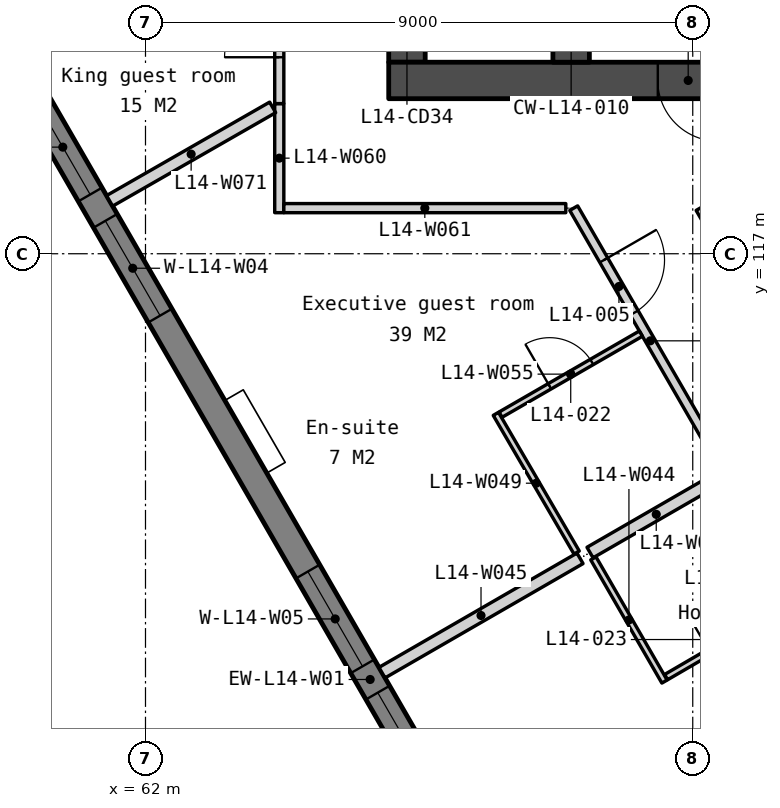
"""IFC4 building model, lengths in metres.
Left out: names, types, materials, properties, quantities, classifications, styles, units other than length and angle.
Written with IfcOpenShell. Run it as: python <this file> out.ifc"""

import sys

from ifc_helpers import new_model, si_unit, direction, frame, frame_2d, origin, place, context, subcontext, project, spatial, polyline, rectangle, outline, extrude, element, fill, save


model = new_model("IFC4")
c1 = context("Model", 3, precision=1e-05, world=origin(), true_north=direction((0.0, 1.0)))
c2 = subcontext(c1, "Body", "Model", "MODEL_VIEW")
j1 = project(units=[si_unit("LENGTHUNIT", "METRE"), si_unit("PLANEANGLEUNIT", "RADIAN")], contexts=[c1])
p1 = place(None, origin())
s1 = spatial("IfcSite", under=j1, at=p1, CompositionType="ELEMENT")
p2 = place(p1, origin())
s2 = spatial("IfcBuilding", under=s1, at=p2, CompositionType="ELEMENT")
p3 = place(p2, frame((0.0, 0.0, 63.0)))
s3 = spatial("IfcBuildingStorey", under=s2, at=p3, CompositionType="ELEMENT", Elevation=63.0)
p4 = place(p3, frame((66.3, 133.95, 0.0), z_axis=(0.0, 0.0, 1.0), x_axis=(0.0, -1.0, 0.0)))
e1 = element("IfcWall", 1, at=p4, inside=s3, PredefinedType="SOLIDWALL", context=c2, shape_type="SweptSolid", body=[
    extrude(rectangle(XDim=13.8, YDim=0.6, at=frame_2d((6.9, 0.0))), origin(), (0.0, 0.0, 1.0), 3.35),
])
p5 = place(p4, frame((0.6, 0.0, 0.0)))
e2 = element("IfcOpeningElement", 2, at=p5, cuts=e1, PredefinedType="OPENING", context=c2, shape_type="SweptSolid", body=[
    extrude(rectangle(XDim=1.1, YDim=2.1, at=frame_2d((0.55, 1.05))), frame((0.0, 0.31, 0.0), z_axis=(0.0, -1.0, 0.0), x_axis=(1.0, 0.0, 0.0)), (0.0, 0.0, 1.0), 0.62),
])
p6 = place(p4, frame((12.4, 0.0, 0.0)))
e3 = element("IfcOpeningElement", 3, at=p6, cuts=e1, PredefinedType="OPENING", context=c2, shape_type="SweptSolid", body=[
    extrude(rectangle(XDim=1.0, YDim=2.1, at=frame_2d((0.5, 1.05))), frame((0.0, 0.31, 0.0), z_axis=(0.0, -1.0, 0.0), x_axis=(1.0, 0.0, 0.0)), (0.0, 0.0, 1.0), 0.62),
])
p7 = place(p4, frame((8.5, 0.0, 0.0)))
e4 = element("IfcOpeningElement", 4, at=p7, cuts=e1, PredefinedType="OPENING", context=c2, shape_type="SweptSolid", body=[
    extrude(rectangle(XDim=1.0, YDim=2.1, at=frame_2d((0.5, 1.05))), frame((0.0, 0.31, 0.0), z_axis=(0.0, -1.0, 0.0), x_axis=(1.0, 0.0, 0.0)), (0.0, 0.0, 1.0), 0.62),
])
p8 = place(p4, frame((10.45, 0.0, 0.0)))
e5 = element("IfcOpeningElement", 5, at=p8, cuts=e1, PredefinedType="OPENING", context=c2, shape_type="SweptSolid", body=[
    extrude(rectangle(XDim=1.0, YDim=2.1, at=frame_2d((0.5, 1.05))), frame((0.0, 0.31, 0.0), z_axis=(0.0, -1.0, 0.0), x_axis=(1.0, 0.0, 0.0)), (0.0, 0.0, 1.0), 0.62),
])
p9 = place(p3, frame((66.0, 119.85, 0.0), z_axis=(0.0, 0.0, 1.0), x_axis=(1.0, 0.0, 0.0)))
e6 = element("IfcWall", 6, at=p9, inside=s3, PredefinedType="SOLIDWALL", context=c2, shape_type="SweptSolid", body=[
    extrude(rectangle(XDim=28.0, YDim=0.6, at=frame_2d((14.0, 0.0))), origin(), (0.0, 0.0, 1.0), 3.35),
])
p10 = place(p9, frame((6.825, 0.0, 0.0)))
e7 = element("IfcOpeningElement", 7, at=p10, cuts=e6, PredefinedType="OPENING", context=c2, shape_type="SweptSolid", body=[
    extrude(rectangle(XDim=1.8, YDim=2.1, at=frame_2d((0.9, 1.05))), frame((0.0, 0.31, 0.0), z_axis=(0.0, -1.0, 0.0), x_axis=(1.0, 0.0, 0.0)), (0.0, 0.0, 1.0), 0.62),
])
p11 = place(p9, frame((15.85, 0.0, 0.0)))
e8 = element("IfcOpeningElement", 8, at=p11, cuts=e6, PredefinedType="OPENING", context=c2, shape_type="SweptSolid", body=[
    extrude(rectangle(XDim=1.5, YDim=2.1, at=frame_2d((0.75, 1.05))), frame((0.0, 0.31, 0.0), z_axis=(0.0, -1.0, 0.0), x_axis=(1.0, 0.0, 0.0)), (0.0, 0.0, 1.0), 0.62),
])
p12 = place(p9, frame((19.375, 0.0, 0.0)))
e9 = element("IfcOpeningElement", 9, at=p12, cuts=e6, PredefinedType="OPENING", context=c2, shape_type="SweptSolid", body=[
    extrude(rectangle(XDim=1.8, YDim=2.1, at=frame_2d((0.9, 1.05))), frame((0.0, 0.31, 0.0), z_axis=(0.0, -1.0, 0.0), x_axis=(1.0, 0.0, 0.0)), (0.0, 0.0, 1.0), 0.62),
])
p13 = place(p9, frame((4.425, 0.0, 0.0)))
e10 = element("IfcOpeningElement", 10, at=p13, cuts=e6, PredefinedType="OPENING", context=c2, shape_type="SweptSolid", body=[
    extrude(rectangle(XDim=1.0, YDim=2.1, at=frame_2d((0.5, 1.05))), frame((0.0, 0.31, 0.0), z_axis=(0.0, -1.0, 0.0), x_axis=(1.0, 0.0, 0.0)), (0.0, 0.0, 1.0), 0.62),
])
p14 = place(p9, frame((9.925, 0.0, 0.0)))
e11 = element("IfcOpeningElement", 11, at=p14, cuts=e6, PredefinedType="OPENING", context=c2, shape_type="SweptSolid", body=[
    extrude(rectangle(XDim=1.0, YDim=2.1, at=frame_2d((0.5, 1.05))), frame((0.0, 0.31, 0.0), z_axis=(0.0, -1.0, 0.0), x_axis=(1.0, 0.0, 0.0)), (0.0, 0.0, 1.0), 0.62),
])
p15 = place(p9, frame((13.125, 0.0, 0.0)))
e12 = element("IfcOpeningElement", 12, at=p15, cuts=e6, PredefinedType="OPENING", context=c2, shape_type="SweptSolid", body=[
    extrude(rectangle(XDim=1.0, YDim=2.1, at=frame_2d((0.5, 1.05))), frame((0.0, 0.31, 0.0), z_axis=(0.0, -1.0, 0.0), x_axis=(1.0, 0.0, 0.0)), (0.0, 0.0, 1.0), 0.62),
])
p16 = place(p9, frame((21.725, 0.0, 0.0)))
e13 = element("IfcOpeningElement", 13, at=p16, cuts=e6, PredefinedType="OPENING", context=c2, shape_type="SweptSolid", body=[
    extrude(rectangle(XDim=1.0, YDim=2.1, at=frame_2d((0.5, 1.05))), frame((0.0, 0.31, 0.0), z_axis=(0.0, -1.0, 0.0), x_axis=(1.0, 0.0, 0.0)), (0.0, 0.0, 1.0), 0.62),
])
p17 = place(p9, frame((23.425, 0.0, 0.0)))
e14 = element("IfcOpeningElement", 14, at=p17, cuts=e6, PredefinedType="OPENING", context=c2, shape_type="SweptSolid", body=[
    extrude(rectangle(XDim=1.0, YDim=2.1, at=frame_2d((0.5, 1.05))), frame((0.0, 0.31, 0.0), z_axis=(0.0, -1.0, 0.0), x_axis=(1.0, 0.0, 0.0)), (0.0, 0.0, 1.0), 0.62),
])
p18 = place(p3, frame((69.0, 122.25, 0.0), z_axis=(0.0, 0.0, 1.0), x_axis=(0.0, -1.0, 0.0)))
e15 = element("IfcWall", 15, at=p18, inside=s3, PredefinedType="SOLIDWALL", context=c2, shape_type="SweptSolid", body=[
    extrude(rectangle(XDim=2.1, YDim=0.6, at=frame_2d((1.05, 0.0))), origin(), (0.0, 0.0, 1.0), 3.35),
])
p19 = place(p3, frame((54.495, 129.397, -0.15), z_axis=(0.0, 0.0, 1.0), x_axis=(0.499999201451, -0.866025864826, 0.0)))
e16 = element("IfcWall", 16, at=p19, inside=s3, PredefinedType="SOLIDWALL", context=c2, shape_type="SweptSolid", body=[
    extrude(outline(polyline([(44.8, 0.0), (44.8, 3.5), (0.0, 3.5), (0.0, 0.0), (44.8, 0.0)])), frame((0.0, 0.225, 0.0), z_axis=(0.0, -1.0, 0.0), x_axis=(1.0, 0.0, 0.0)), (0.0, 0.0, 1.0), 0.45),
])
p20 = place(p19, frame((2.43, 0.0, 1.05)))
e17 = element("IfcOpeningElement", 17, at=p20, cuts=e16, PredefinedType="OPENING", context=c2, shape_type="SweptSolid", body=[
    extrude(rectangle(XDim=1.8, YDim=1.5, at=frame_2d((0.9, 0.75))), frame((0.0, 0.235, 0.0), z_axis=(0.0, -1.0, 0.0), x_axis=(1.0, 0.0, 0.0)), (0.0, 0.0, 1.0), 0.47),
])
p21 = place(p19, frame((4.73, 0.0, 1.05)))
e18 = element("IfcOpeningElement", 18, at=p21, cuts=e16, PredefinedType="OPENING", context=c2, shape_type="SweptSolid", body=[
    extrude(rectangle(XDim=1.8, YDim=1.5, at=frame_2d((0.9, 0.75))), frame((0.0, 0.235, 0.0), z_axis=(0.0, -1.0, 0.0), x_axis=(1.0, 0.0, 0.0)), (0.0, 0.0, 1.0), 0.47),
])
p22 = place(p19, frame((11.39, 0.0, 1.05)))
e19 = element("IfcOpeningElement", 19, at=p22, cuts=e16, PredefinedType="OPENING", context=c2, shape_type="SweptSolid", body=[
    extrude(rectangle(XDim=1.8, YDim=1.5, at=frame_2d((0.9, 0.75))), frame((0.0, 0.235, 0.0), z_axis=(0.0, -1.0, 0.0), x_axis=(1.0, 0.0, 0.0)), (0.0, 0.0, 1.0), 0.47),
])
p23 = place(p19, frame((13.69, 0.0, 1.05)))
e20 = element("IfcOpeningElement", 20, at=p23, cuts=e16, PredefinedType="OPENING", context=c2, shape_type="SweptSolid", body=[
    extrude(rectangle(XDim=1.8, YDim=1.5, at=frame_2d((0.9, 0.75))), frame((0.0, 0.235, 0.0), z_axis=(0.0, -1.0, 0.0), x_axis=(1.0, 0.0, 0.0)), (0.0, 0.0, 1.0), 0.47),
])
p24 = place(p19, frame((20.35, 0.0, 1.05)))
e21 = element("IfcOpeningElement", 21, at=p24, cuts=e16, PredefinedType="OPENING", context=c2, shape_type="SweptSolid", body=[
    extrude(rectangle(XDim=1.8, YDim=1.5, at=frame_2d((0.9, 0.75))), frame((0.0, 0.235, 0.0), z_axis=(0.0, -1.0, 0.0), x_axis=(1.0, 0.0, 0.0)), (0.0, 0.0, 1.0), 0.47),
])
p25 = place(p19, frame((22.65, 0.0, 1.05)))
e22 = element("IfcOpeningElement", 22, at=p25, cuts=e16, PredefinedType="OPENING", context=c2, shape_type="SweptSolid", body=[
    extrude(rectangle(XDim=1.8, YDim=1.5, at=frame_2d((0.9, 0.75))), frame((0.0, 0.235, 0.0), z_axis=(0.0, -1.0, 0.0), x_axis=(1.0, 0.0, 0.0)), (0.0, 0.0, 1.0), 0.47),
])
p26 = place(p19, frame((29.31, 0.0, 1.05)))
e23 = element("IfcOpeningElement", 23, at=p26, cuts=e16, PredefinedType="OPENING", context=c2, shape_type="SweptSolid", body=[
    extrude(rectangle(XDim=1.8, YDim=1.5, at=frame_2d((0.9, 0.75))), frame((0.0, 0.235, 0.0), z_axis=(0.0, -1.0, 0.0), x_axis=(1.0, 0.0, 0.0)), (0.0, 0.0, 1.0), 0.47),
])
p27 = place(p19, frame((31.61, 0.0, 1.05)))
e24 = element("IfcOpeningElement", 24, at=p27, cuts=e16, PredefinedType="OPENING", context=c2, shape_type="SweptSolid", body=[
    extrude(rectangle(XDim=1.8, YDim=1.5, at=frame_2d((0.9, 0.75))), frame((0.0, 0.235, 0.0), z_axis=(0.0, -1.0, 0.0), x_axis=(1.0, 0.0, 0.0)), (0.0, 0.0, 1.0), 0.47),
])
p28 = place(p19, frame((38.27, 0.0, 1.05)))
e25 = element("IfcOpeningElement", 25, at=p28, cuts=e16, PredefinedType="OPENING", context=c2, shape_type="SweptSolid", body=[
    extrude(rectangle(XDim=1.8, YDim=1.5, at=frame_2d((0.9, 0.75))), frame((0.0, 0.235, 0.0), z_axis=(0.0, -1.0, 0.0), x_axis=(1.0, 0.0, 0.0)), (0.0, 0.0, 1.0), 0.47),
])
p29 = place(p19, frame((40.57, 0.0, 1.05)))
e26 = element("IfcOpeningElement", 26, at=p29, cuts=e16, PredefinedType="OPENING", context=c2, shape_type="SweptSolid", body=[
    extrude(rectangle(XDim=1.8, YDim=1.5, at=frame_2d((0.9, 0.75))), frame((0.0, 0.235, 0.0), z_axis=(0.0, -1.0, 0.0), x_axis=(1.0, 0.0, 0.0)), (0.0, 0.0, 1.0), 0.47),
])
p30 = place(p3, frame((68.13, 106.23, 0.0), z_axis=(0.0, 0.0, 1.0), x_axis=(0.86603151488, 0.499989415123, 0.0)))
e27 = element("IfcWall", 27, at=p30, inside=s3, PredefinedType="PARTITIONING", context=c2, shape_type="SweptSolid", body=[
    extrude(rectangle(XDim=6.465, YDim=0.2, at=frame_2d((3.232, 0.0))), origin(), (0.0, 0.0, 1.0), 3.35),
])
p31 = place(p3, frame((69.365, 111.99, 0.0), z_axis=(0.0, 0.0, 1.0), x_axis=(0.499999433879, -0.866025730634, 0.0)))
e28 = element("IfcWall", 28, at=p31, inside=s3, PredefinedType="PARTITIONING", context=c2, shape_type="SweptSolid", body=[
    extrude(rectangle(XDim=2.34, YDim=0.1, at=frame_2d((1.17, 0.0))), origin(), (0.0, 0.0, 1.0), 3.35),
])
p32 = place(p3, frame((65.89, 110.11, 0.0), z_axis=(0.0, 0.0, 1.0), x_axis=(0.866045024864, 0.499966013754, 0.0)))
e29 = element("IfcWall", 29, at=p32, inside=s3, PredefinedType="PARTITIONING", context=c2, shape_type="SweptSolid", body=[
    extrude(rectangle(XDim=3.76, YDim=0.2, at=frame_2d((1.88, 0.0))), origin(), (0.0, 0.0, 1.0), 3.35),
])
p33 = place(p3, frame((70.562, 110.037, 0.0), z_axis=(0.0, 0.0, 1.0), x_axis=(0.864132137734, 0.503264988386, 0.0)))
e30 = element("IfcWall", 30, at=p33, inside=s3, PredefinedType="PARTITIONING", context=c2, shape_type="SweptSolid", body=[
    extrude(rectangle(XDim=2.455, YDim=0.1, at=frame_2d((1.228, 0.0))), origin(), (0.0, 0.0, 1.0), 3.35),
])
p34 = place(p33, frame((0.827, 0.0, 0.0)))
e31 = element("IfcOpeningElement", 31, at=p34, cuts=e30, PredefinedType="OPENING", context=c2, shape_type="SweptSolid", body=[
    extrude(rectangle(XDim=0.8, YDim=2.1, at=frame_2d((0.4, 1.05))), frame((0.0, 0.06, 0.0), z_axis=(0.0, -1.0, 0.0), x_axis=(1.0, 0.0, 0.0)), (0.0, 0.0, 1.0), 0.12),
])
p35 = place(p3, frame((67.762, 114.367, 0.0), z_axis=(0.0, 0.0, 1.0), x_axis=(0.503163628445, -0.86419116115, 0.0)))
e32 = element("IfcWall", 32, at=p35, inside=s3, PredefinedType="PARTITIONING", context=c2, shape_type="SweptSolid", body=[
    extrude(rectangle(XDim=2.64, YDim=0.1, at=frame_2d((1.32, 0.0))), origin(), (0.0, 0.0, 1.0), 3.35),
])
p36 = place(p3, frame((69.311, 112.085, 0.0), z_axis=(0.0, 0.0, 1.0), x_axis=(0.866006140796, 0.500033362991, 0.0)))
e33 = element("IfcWall", 33, at=p36, inside=s3, PredefinedType="PARTITIONING", context=c2, shape_type="SweptSolid", body=[
    extrude(rectangle(XDim=2.515, YDim=0.2, at=frame_2d((1.257, 0.0))), origin(), (0.0, 0.0, 1.0), 3.35),
])
p37 = place(p3, frame((69.042, 117.75, 0.0), z_axis=(0.0, 0.0, 1.0), x_axis=(0.500004791531, -0.866022637375, 0.0)))
e34 = element("IfcWall", 34, at=p37, inside=s3, PredefinedType="PARTITIONING", context=c2, shape_type="SweptSolid", body=[
    extrude(rectangle(XDim=5.04, YDim=0.15, at=frame_2d((2.52, 0.0))), origin(), (0.0, 0.0, 1.0), 3.35),
])
p38 = place(p37, frame((0.988, 0.0, 0.0)))
e35 = element("IfcOpeningElement", 35, at=p38, cuts=e34, PredefinedType="OPENING", context=c2, shape_type="SweptSolid", body=[
    extrude(rectangle(XDim=1.0, YDim=2.1, at=frame_2d((0.5, 1.05))), frame((0.0, 0.085, 0.0), z_axis=(0.0, -1.0, 0.0), x_axis=(1.0, 0.0, 0.0)), (0.0, 0.0, 1.0), 0.17),
])
p39 = place(p3, frame((67.839, 114.354, 0.0), z_axis=(0.0, 0.0, 1.0), x_axis=(0.86601318911, 0.500021155841, 0.0)))
e36 = element("IfcWall", 36, at=p39, inside=s3, PredefinedType="PARTITIONING", context=c2, shape_type="SweptSolid", body=[
    extrude(rectangle(XDim=2.665, YDim=0.1, at=frame_2d((1.333, 0.0))), origin(), (0.0, 0.0, 1.0), 3.35),
])
p40 = place(p39, frame((0.933, 0.0, 0.0)))
e37 = element("IfcOpeningElement", 37, at=p40, cuts=e36, PredefinedType="OPENING", context=c2, shape_type="SweptSolid", body=[
    extrude(rectangle(XDim=0.8, YDim=2.1, at=frame_2d((0.4, 1.05))), frame((0.0, 0.06, 0.0), z_axis=(0.0, -1.0, 0.0), x_axis=(1.0, 0.0, 0.0)), (0.0, 0.0, 1.0), 0.12),
])
p41 = place(p3, frame((64.2, 117.675, 0.0), z_axis=(0.0, 0.0, 1.0), x_axis=(0.0, 1.0, 0.0)))
e38 = element("IfcWall", 38, at=p41, inside=s3, PredefinedType="PARTITIONING", context=c2, shape_type="SweptSolid", body=[
    extrude(rectangle(XDim=1.794, YDim=0.15, at=frame_2d((0.897, 0.0))), origin(), (0.0, 0.0, 1.0), 3.35),
])
p42 = place(p3, frame((64.275, 117.75, 0.0), z_axis=(0.0, 0.0, 1.0), x_axis=(1.0, 0.0, 0.0)))
e39 = element("IfcWall", 39, at=p42, inside=s3, PredefinedType="PARTITIONING", context=c2, shape_type="SweptSolid", body=[
    extrude(rectangle(XDim=4.637, YDim=0.15, at=frame_2d((2.319, 0.0))), origin(), (0.0, 0.0, 1.0), 3.35),
])
p43 = place(p3, frame((71.121, 117.75, 0.0), z_axis=(0.0, 0.0, 1.0), x_axis=(0.499995104884, -0.866028229963, 0.0)))
e40 = element("IfcWall", 40, at=p43, inside=s3, PredefinedType="PARTITIONING", context=c2, shape_type="SweptSolid", body=[
    extrude(rectangle(XDim=12.557, YDim=0.15, at=frame_2d((6.278, 0.0))), origin(), (0.0, 0.0, 1.0), 3.35),
])
p44 = place(p43, frame((5.828, 0.0, 0.0)))
e41 = element("IfcOpeningElement", 41, at=p44, cuts=e40, PredefinedType="OPENING", context=c2, shape_type="SweptSolid", body=[
    extrude(rectangle(XDim=0.9, YDim=2.1, at=frame_2d((0.45, 1.05))), frame((0.0, 0.085, 0.0), z_axis=(0.0, -1.0, 0.0), x_axis=(1.0, 0.0, 0.0)), (0.0, 0.0, 1.0), 0.17),
])
p45 = place(p3, frame((61.41, 117.87, 0.0), z_axis=(0.0, 0.0, 1.0), x_axis=(0.867566776681, 0.4973207094, 0.0)))
e42 = element("IfcWall", 42, at=p45, inside=s3, PredefinedType="PARTITIONING", context=c2, shape_type="SweptSolid", body=[
    extrude(rectangle(XDim=3.091, YDim=0.2, at=frame_2d((1.546, 0.0))), origin(), (0.0, 0.0, 1.0), 3.35),
])
p46 = place(p3, frame((64.2, 119.469, 0.0), z_axis=(0.0, 0.0, 1.0), x_axis=(0.0, 1.0, 0.0)))
e43 = element("IfcWall", 43, at=p46, inside=s3, PredefinedType="PARTITIONING", context=c2, shape_type="SweptSolid", body=[
    extrude(rectangle(XDim=2.425, YDim=0.15, at=frame_2d((1.212, 0.0))), origin(), (0.0, 0.0, 1.0), 3.35),
])
p47 = place(p46, frame((0.762, 0.0, 0.0)))
e44 = element("IfcOpeningElement", 44, at=p47, cuts=e43, PredefinedType="OPENING", context=c2, shape_type="SweptSolid", body=[
    extrude(rectangle(XDim=0.9, YDim=2.1, at=frame_2d((0.45, 1.05))), frame((0.0, 0.085, 0.0), z_axis=(0.0, -1.0, 0.0), x_axis=(1.0, 0.0, 0.0)), (0.0, 0.0, 1.0), 0.17),
])
p48 = place(p13, origin())
e45 = element("IfcDoor", 45, at=p48, inside=s3, OperationType="SINGLE_SWING_RIGHT", PredefinedType="DOOR", context=c2, shape_type="SweptSolid", body=[
    extrude(rectangle(XDim=1.0, YDim=2.1, at=frame_2d((0.5, 1.05))), frame((0.0, 0.025, 0.0), z_axis=(0.0, -1.0, 0.0), x_axis=(1.0, 0.0, 0.0)), (0.0, 0.0, 1.0), 0.05),
])
fill(e10, e45)
p49 = place(p22, origin())
e46 = element("IfcWindow", 46, at=p49, inside=s3, PartitioningType="SINGLE_PANEL", PredefinedType="WINDOW", context=c2, shape_type="SweptSolid", body=[
    extrude(rectangle(XDim=1.8, YDim=1.5, at=frame_2d((0.9, 0.75))), frame((0.0, 0.03, 0.0), z_axis=(0.0, -1.0, 0.0), x_axis=(1.0, 0.0, 0.0)), (0.0, 0.0, 1.0), 0.06),
])
fill(e19, e46)
p50 = place(p23, origin())
e47 = element("IfcWindow", 47, at=p50, inside=s3, PartitioningType="SINGLE_PANEL", PredefinedType="WINDOW", context=c2, shape_type="SweptSolid", body=[
    extrude(rectangle(XDim=1.8, YDim=1.5, at=frame_2d((0.9, 0.75))), frame((0.0, 0.03, 0.0), z_axis=(0.0, -1.0, 0.0), x_axis=(1.0, 0.0, 0.0)), (0.0, 0.0, 1.0), 0.06),
])
fill(e20, e47)
p51 = place(p24, origin())
e48 = element("IfcWindow", 48, at=p51, inside=s3, PartitioningType="SINGLE_PANEL", PredefinedType="WINDOW", context=c2, shape_type="SweptSolid", body=[
    extrude(rectangle(XDim=1.8, YDim=1.5, at=frame_2d((0.9, 0.75))), frame((0.0, 0.03, 0.0), z_axis=(0.0, -1.0, 0.0), x_axis=(1.0, 0.0, 0.0)), (0.0, 0.0, 1.0), 0.06),
])
fill(e21, e48)
p52 = place(p25, origin())
e49 = element("IfcWindow", 49, at=p52, inside=s3, PartitioningType="SINGLE_PANEL", PredefinedType="WINDOW", context=c2, shape_type="SweptSolid", body=[
    extrude(rectangle(XDim=1.8, YDim=1.5, at=frame_2d((0.9, 0.75))), frame((0.0, 0.03, 0.0), z_axis=(0.0, -1.0, 0.0), x_axis=(1.0, 0.0, 0.0)), (0.0, 0.0, 1.0), 0.06),
])
fill(e22, e49)
p53 = place(p47, origin())
e50 = element("IfcDoor", 50, at=p53, inside=s3, OperationType="SINGLE_SWING_LEFT", PredefinedType="DOOR", context=c2, shape_type="SweptSolid", body=[
    extrude(rectangle(XDim=0.9, YDim=2.1, at=frame_2d((0.45, 1.05))), frame((0.0, 0.025, 0.0), z_axis=(0.0, -1.0, 0.0), x_axis=(1.0, 0.0, 0.0)), (0.0, 0.0, 1.0), 0.05),
])
fill(e44, e50)
p54 = place(p38, origin())
e51 = element("IfcDoor", 51, at=p54, inside=s3, OperationType="SINGLE_SWING_LEFT", PredefinedType="DOOR", context=c2, shape_type="SweptSolid", body=[
    extrude(rectangle(XDim=1.0, YDim=2.1, at=frame_2d((0.5, 1.05))), frame((0.0, 0.025, 0.0), z_axis=(0.0, -1.0, 0.0), x_axis=(1.0, 0.0, 0.0)), (0.0, 0.0, 1.0), 0.05),
])
fill(e35, e51)
p55 = place(p40, origin())
e52 = element("IfcDoor", 52, at=p55, inside=s3, OperationType="SINGLE_SWING_LEFT", PredefinedType="DOOR", context=c2, shape_type="SweptSolid", body=[
    extrude(rectangle(XDim=0.8, YDim=2.1, at=frame_2d((0.4, 1.05))), frame((0.0, 0.025, 0.0), z_axis=(0.0, -1.0, 0.0), x_axis=(1.0, 0.0, 0.0)), (0.0, 0.0, 1.0), 0.05),
])
fill(e37, e52)
save(model, sys.argv[1])
